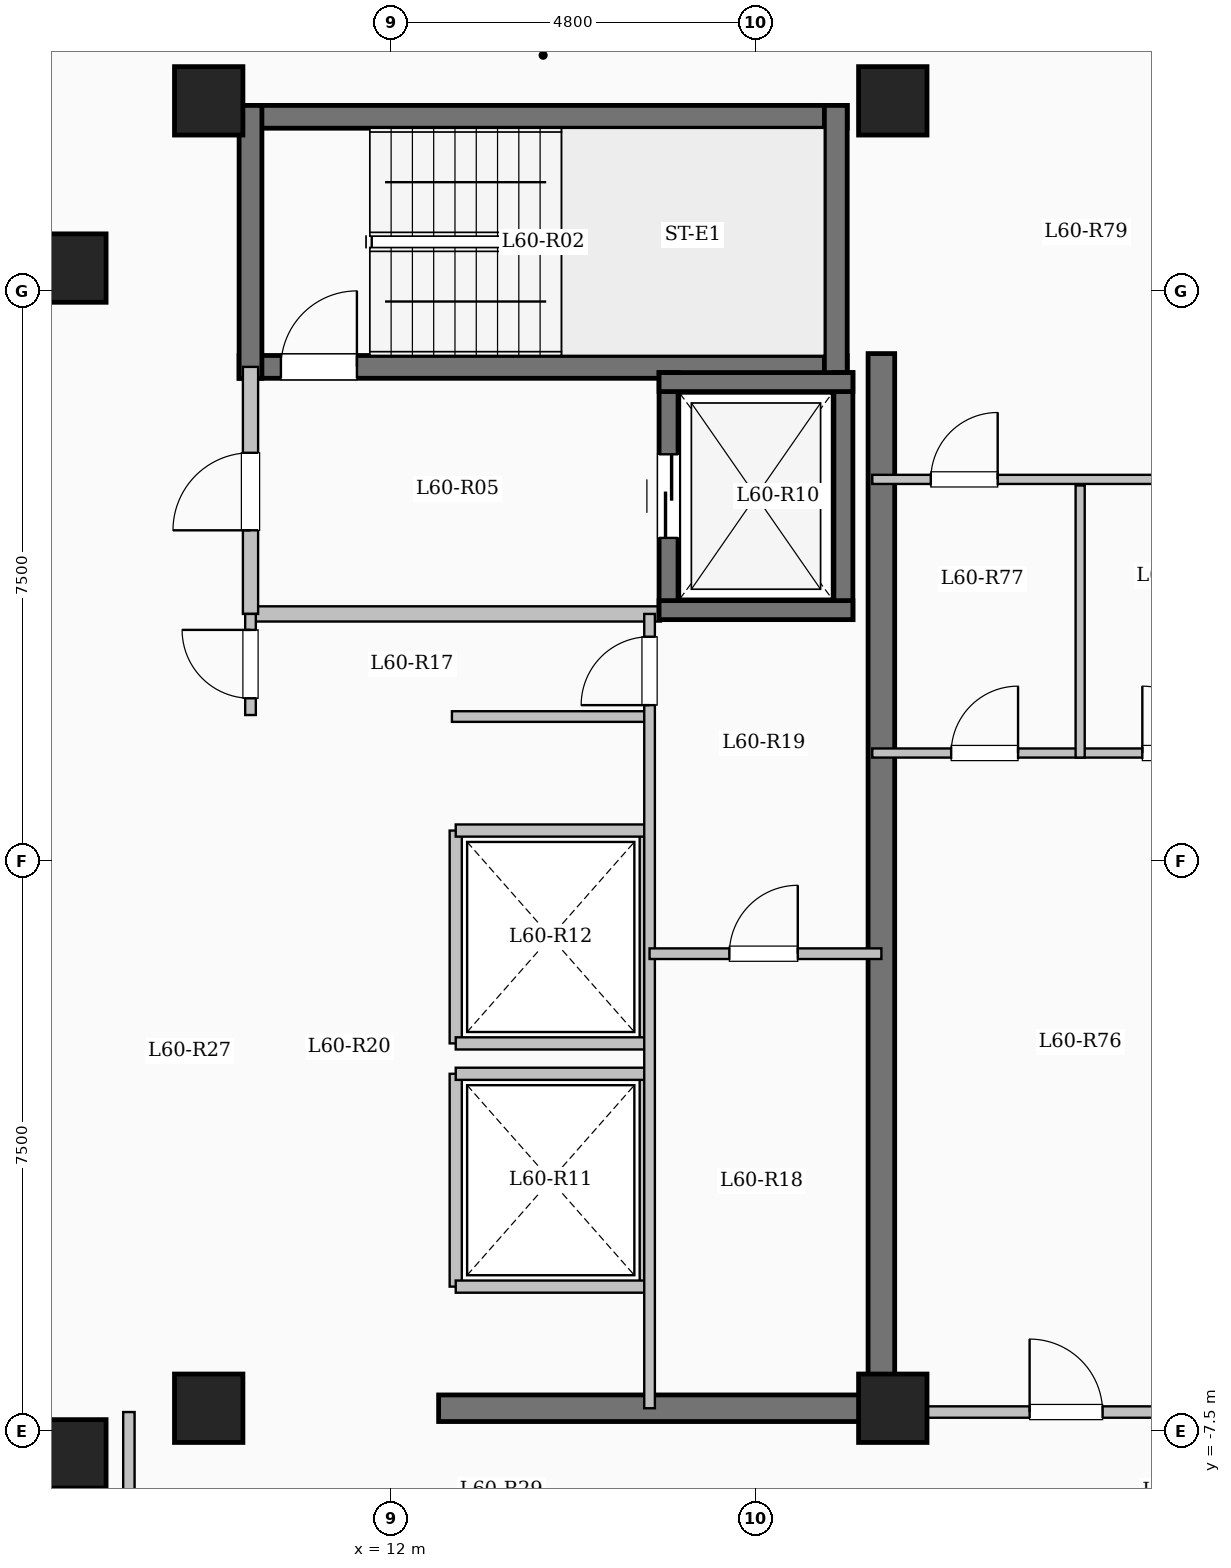
"""IFC4 building model, lengths in metres.
Left out: names, types, materials, properties, quantities, classifications, styles, units other than length and angle.
Written with IfcOpenShell. Run it as: python <this file> out.ifc"""

import sys

from ifc_helpers import new_model, si_unit, direction, frame, frame_2d, origin, origin_2d, place, context, subcontext, project, spatial, rectangle, extrude, element, fill, save


model = new_model("IFC4")
c1 = context("Model", 3, precision=1e-05, world=origin(), true_north=direction((0.0, 1.0)))
c2 = subcontext(c1, "Body", "Model", "MODEL_VIEW")
j1 = project(units=[si_unit("LENGTHUNIT", "METRE"), si_unit("PLANEANGLEUNIT", "RADIAN")], contexts=[c1])
p1 = place(None, origin())
s1 = spatial("IfcSite", under=j1, at=p1, CompositionType="ELEMENT")
p2 = place(p1, origin())
s2 = spatial("IfcBuilding", under=s1, at=p2, CompositionType="ELEMENT")
p3 = place(p2, frame((0.0, 0.0, 220.4)))
s3 = spatial("IfcBuildingStorey", under=s2, at=p3, CompositionType="ELEMENT", Elevation=220.4)
for number, where, z_axis, x_axis in (
    (1, (7.8, -7.8, 0.0), (0.0, 0.0, 1.0), (1.0, 0.0, 0.0)),
    (2, (7.8, 7.8, 0.0), (0.0, 0.0, 1.0), (1.0, 0.0, 0.0)),
    (3, (9.6, -7.2, 0.0), (0.0, 0.0, 1.0), (1.0, 0.0, 0.0)),
    (4, (9.6, 10.0, 0.0), (0.0, 0.0, 1.0), (1.0, 0.0, 0.0)),
    (5, (18.6, -7.2, 0.0), (0.0, 0.0, 1.0), (1.0, 0.0, 0.0)),
    (6, (18.6, 10.0, 0.0), (0.0, 0.0, 1.0), (1.0, 0.0, 0.0)),
):
    element("IfcColumn", number, at=place(p3, frame(where, z_axis=z_axis, x_axis=x_axis)), inside=s3, PredefinedType="COLUMN", context=c2, shape_type="SweptSolid", body=[
        extrude(rectangle(XDim=0.9, YDim=0.9, at=origin_2d()), origin(), (0.0, 0.0, 1.0), 3.35),
    ])
p4 = place(p3, frame((10.0, 9.79, 0.0), z_axis=(0.0, 0.0, 1.0), x_axis=(1.0, 0.0, 0.0)))
e7 = element("IfcWall", 7, at=p4, inside=s3, PredefinedType="SHEAR", context=c2, shape_type="SweptSolid", body=[
    extrude(rectangle(XDim=8.0, YDim=0.3, at=frame_2d((4.0, 0.0))), origin(), (0.0, 0.0, 1.0), 3.35),
])
p5 = place(p3, frame((10.0, 6.5, 0.0), z_axis=(0.0, 0.0, 1.0), x_axis=(1.0, 0.0, 0.0)))
e8 = element("IfcWall", 8, at=p5, inside=s3, PredefinedType="SHEAR", context=c2, shape_type="SweptSolid", body=[
    extrude(rectangle(XDim=8.0, YDim=0.3, at=frame_2d((4.0, 0.0))), origin(), (0.0, 0.0, 1.0), 3.35),
])
p6 = place(p5, frame((0.55, 0.0, 0.0)))
e9 = element("IfcOpeningElement", 9, at=p6, cuts=e8, PredefinedType="OPENING", context=c2, shape_type="SweptSolid", body=[
    extrude(rectangle(XDim=1.0, YDim=2.15, at=frame_2d((0.5, 1.075))), frame((0.0, 0.16, 0.0), z_axis=(0.0, -1.0, 0.0), x_axis=(1.0, 0.0, 0.0)), (0.0, 0.0, 1.0), 0.32),
])
for number, where, z_axis, x_axis in (
    (10, (10.15, 6.35, 0.0), (0.0, 0.0, 1.0), (0.0, 1.0, 0.0)),
    (11, (17.85, 6.35, 0.0), (0.0, 0.0, 1.0), (0.0, 1.0, 0.0)),
):
    element("IfcWall", number, at=place(p3, frame(where, z_axis=z_axis, x_axis=x_axis)), inside=s3, PredefinedType="SHEAR", context=c2, shape_type="SweptSolid", body=[
        extrude(rectangle(XDim=3.59, YDim=0.3, at=frame_2d((1.795, 0.0))), origin(), (0.0, 0.0, 1.0), 3.35),
    ])
p7 = place(p3, frame((10.15, 3.25, 0.0), z_axis=(0.0, 0.0, 1.0), x_axis=(1.0, 0.0, 0.0)))
e12 = element("IfcWall", 12, at=p7, inside=s3, PredefinedType="SOLIDWALL", context=c2, shape_type="SweptSolid", body=[
    extrude(rectangle(XDim=5.4, YDim=0.2, at=frame_2d((2.7, 0.0))), origin(), (0.0, 0.0, 1.0), 3.1),
])
p8 = place(p3, frame((10.15, 3.25, 0.0), z_axis=(0.0, 0.0, 1.0), x_axis=(0.0, 1.0, 0.0)))
e13 = element("IfcWall", 13, at=p8, inside=s3, PredefinedType="SOLIDWALL", context=c2, shape_type="SweptSolid", body=[
    extrude(rectangle(XDim=3.25, YDim=0.2, at=frame_2d((1.625, 0.0))), origin(), (0.0, 0.0, 1.0), 3.1),
])
p9 = place(p8, frame((1.1, 0.0, 0.0)))
e14 = element("IfcOpeningElement", 14, at=p9, cuts=e13, PredefinedType="OPENING", context=c2, shape_type="SweptSolid", body=[
    extrude(rectangle(XDim=1.02, YDim=2.15, at=frame_2d((0.51, 1.075))), frame((0.0, 0.11, 0.0), z_axis=(0.0, -1.0, 0.0), x_axis=(1.0, 0.0, 0.0)), (0.0, 0.0, 1.0), 0.22),
])
p10 = place(p3, frame((15.65, 3.175, 0.0), z_axis=(0.0, 0.0, 1.0), x_axis=(0.0, 1.0, 0.0)))
e15 = element("IfcWall", 15, at=p10, inside=s3, PredefinedType="SHEAR", context=c2, shape_type="SweptSolid", body=[
    extrude(rectangle(XDim=3.25, YDim=0.25, at=frame_2d((1.625, 0.0))), origin(), (0.0, 0.0, 1.0), 3.35),
])
p11 = place(p10, frame((1.075, 0.0, 0.0)))
e16 = element("IfcOpeningElement", 16, at=p11, cuts=e15, PredefinedType="OPENING", context=c2, shape_type="SweptSolid", body=[
    extrude(rectangle(XDim=1.1, YDim=2.15, at=frame_2d((0.55, 1.075))), frame((0.0, 0.135, 0.0), z_axis=(0.0, -1.0, 0.0), x_axis=(1.0, 0.0, 0.0)), (0.0, 0.0, 1.0), 0.27),
])
p12 = place(p3, frame((17.95, 3.175, 0.0), z_axis=(0.0, 0.0, 1.0), x_axis=(0.0, 1.0, 0.0)))
e17 = element("IfcWall", 17, at=p12, inside=s3, PredefinedType="SHEAR", context=c2, shape_type="SweptSolid", body=[
    extrude(rectangle(XDim=3.25, YDim=0.25, at=frame_2d((1.625, 0.0))), origin(), (0.0, 0.0, 1.0), 3.35),
])
for number, where, z_axis, x_axis in (
    (18, (15.525, 3.3, 0.0), (0.0, 0.0, 1.0), (1.0, 0.0, 0.0)),
    (19, (15.525, 6.3, 0.0), (0.0, 0.0, 1.0), (1.0, 0.0, 0.0)),
):
    element("IfcWall", number, at=place(p3, frame(where, z_axis=z_axis, x_axis=x_axis)), inside=s3, PredefinedType="SHEAR", context=c2, shape_type="SweptSolid", body=[
        extrude(rectangle(XDim=2.55, YDim=0.25, at=frame_2d((1.275, 0.0))), origin(), (0.0, 0.0, 1.0), 3.35),
    ])
for number, where, z_axis, x_axis in (
    (20, (12.85, -5.6, 0.0), (0.0, 0.0, 1.0), (0.0, 1.0, 0.0)),
    (21, (15.35, -5.6, 0.0), (0.0, 0.0, 1.0), (0.0, 1.0, 0.0)),
):
    element("IfcWall", number, at=place(p3, frame(where, z_axis=z_axis, x_axis=x_axis)), inside=s3, PredefinedType="SOLIDWALL", context=c2, shape_type="SweptSolid", body=[
        extrude(rectangle(XDim=2.8, YDim=0.16, at=frame_2d((1.4, 0.0))), origin(), (0.0, 0.0, 1.0), 3.1),
    ])
for number, where, z_axis, x_axis in (
    (22, (12.85, -5.6, 0.0), (0.0, 0.0, 1.0), (1.0, 0.0, 0.0)),
    (23, (12.85, -2.8, 0.0), (0.0, 0.0, 1.0), (1.0, 0.0, 0.0)),
):
    element("IfcWall", number, at=place(p3, frame(where, z_axis=z_axis, x_axis=x_axis)), inside=s3, PredefinedType="SOLIDWALL", context=c2, shape_type="SweptSolid", body=[
        extrude(rectangle(XDim=2.5, YDim=0.16, at=frame_2d((1.25, 0.0))), origin(), (0.0, 0.0, 1.0), 3.1),
    ])
for number, where, z_axis, x_axis in (
    (24, (12.85, -2.4, 0.0), (0.0, 0.0, 1.0), (0.0, 1.0, 0.0)),
    (25, (15.35, -2.4, 0.0), (0.0, 0.0, 1.0), (0.0, 1.0, 0.0)),
):
    element("IfcWall", number, at=place(p3, frame(where, z_axis=z_axis, x_axis=x_axis)), inside=s3, PredefinedType="SOLIDWALL", context=c2, shape_type="SweptSolid", body=[
        extrude(rectangle(XDim=2.8, YDim=0.16, at=frame_2d((1.4, 0.0))), origin(), (0.0, 0.0, 1.0), 3.1),
    ])
for number, where, z_axis, x_axis in (
    (26, (12.85, -2.4, 0.0), (0.0, 0.0, 1.0), (1.0, 0.0, 0.0)),
    (27, (12.85, 0.4, 0.0), (0.0, 0.0, 1.0), (1.0, 0.0, 0.0)),
):
    element("IfcWall", number, at=place(p3, frame(where, z_axis=z_axis, x_axis=x_axis)), inside=s3, PredefinedType="SOLIDWALL", context=c2, shape_type="SweptSolid", body=[
        extrude(rectangle(XDim=2.5, YDim=0.16, at=frame_2d((1.25, 0.0))), origin(), (0.0, 0.0, 1.0), 3.1),
    ])
p13 = place(p3, frame((18.45, -7.375, 0.0), z_axis=(0.0, 0.0, 1.0), x_axis=(0.0, 1.0, 0.0)))
e28 = element("IfcWall", 28, at=p13, inside=s3, PredefinedType="SHEAR", context=c2, shape_type="SweptSolid", body=[
    extrude(rectangle(XDim=14.05, YDim=0.35, at=frame_2d((7.025, 0.0))), origin(), (0.0, 0.0, 1.0), 3.35),
])
p14 = place(p3, frame((12.625, -7.2, 0.0), z_axis=(0.0, 0.0, 1.0), x_axis=(1.0, 0.0, 0.0)))
e29 = element("IfcWall", 29, at=p14, inside=s3, PredefinedType="SHEAR", context=c2, shape_type="SweptSolid", body=[
    extrude(rectangle(XDim=6.0, YDim=0.35, at=frame_2d((3.0, 0.0))), origin(), (0.0, 0.0, 1.0), 3.35),
])
p15 = place(p3, frame((12.8, 1.9, 0.0), z_axis=(0.0, 0.0, 1.0), x_axis=(1.0, 0.0, 0.0)))
e30 = element("IfcWall", 30, at=p15, inside=s3, PredefinedType="PARTITIONING", context=c2, shape_type="SweptSolid", body=[
    extrude(rectangle(XDim=2.6, YDim=0.14, at=frame_2d((1.3, 0.0))), origin(), (0.0, 0.0, 1.0), 3.1),
])
p16 = place(p3, frame((10.15, 1.92, 0.0), z_axis=(0.0, 0.0, 1.0), x_axis=(0.0, 1.0, 0.0)))
e31 = element("IfcWall", 31, at=p16, inside=s3, PredefinedType="PARTITIONING", context=c2, shape_type="SweptSolid", body=[
    extrude(rectangle(XDim=1.33, YDim=0.14, at=frame_2d((0.665, 0.0))), origin(), (0.0, 0.0, 1.0), 3.1),
])
p17 = place(p16, frame((0.22, 0.0, 0.0)))
e32 = element("IfcOpeningElement", 32, at=p17, cuts=e31, PredefinedType="OPENING", context=c2, shape_type="SweptSolid", body=[
    extrude(rectangle(XDim=0.9, YDim=2.08, at=frame_2d((0.45, 1.04))), frame((0.0, 0.08, 0.0), z_axis=(0.0, -1.0, 0.0), x_axis=(1.0, 0.0, 0.0)), (0.0, 0.0, 1.0), 0.16),
])
p18 = place(p3, frame((15.4, -7.2, 0.0), z_axis=(0.0, 0.0, 1.0), x_axis=(0.0, 1.0, 0.0)))
e33 = element("IfcWall", 33, at=p18, inside=s3, PredefinedType="PARTITIONING", context=c2, shape_type="SweptSolid", body=[
    extrude(rectangle(XDim=10.45, YDim=0.14, at=frame_2d((5.225, 0.0))), origin(), (0.0, 0.0, 1.0), 3.1),
])
p19 = place(p18, frame((9.25, 0.0, 0.0)))
e34 = element("IfcOpeningElement", 34, at=p19, cuts=e33, PredefinedType="OPENING", context=c2, shape_type="SweptSolid", body=[
    extrude(rectangle(XDim=0.9, YDim=2.08, at=frame_2d((0.45, 1.04))), frame((0.0, 0.08, 0.0), z_axis=(0.0, -1.0, 0.0), x_axis=(1.0, 0.0, 0.0)), (0.0, 0.0, 1.0), 0.16),
])
p20 = place(p3, frame((15.4, -1.22, 0.0), z_axis=(0.0, 0.0, 1.0), x_axis=(1.0, 0.0, 0.0)))
e35 = element("IfcWall", 35, at=p20, inside=s3, PredefinedType="PARTITIONING", context=c2, shape_type="SweptSolid", body=[
    extrude(rectangle(XDim=3.05, YDim=0.14, at=frame_2d((1.525, 0.0))), origin(), (0.0, 0.0, 1.0), 3.1),
])
p21 = place(p20, frame((1.05, 0.0, 0.0)))
e36 = element("IfcOpeningElement", 36, at=p21, cuts=e35, PredefinedType="OPENING", context=c2, shape_type="SweptSolid", body=[
    extrude(rectangle(XDim=0.9, YDim=2.08, at=frame_2d((0.45, 1.04))), frame((0.0, 0.08, 0.0), z_axis=(0.0, -1.0, 0.0), x_axis=(1.0, 0.0, 0.0)), (0.0, 0.0, 1.0), 0.16),
])
p22 = place(p3, frame((8.55, -9.4, 0.0), z_axis=(0.0, 0.0, 1.0), x_axis=(0.0, 1.0, 0.0)))
e37 = element("IfcWall", 37, at=p22, inside=s3, PredefinedType="PARTITIONING", context=c2, shape_type="SweptSolid", body=[
    extrude(rectangle(XDim=2.15, YDim=0.15, at=frame_2d((1.075, 0.0))), origin(), (0.0, 0.0, 1.0), 3.1),
])
p23 = place(p3, frame((18.45, -7.25, 0.0), z_axis=(0.0, 0.0, 1.0), x_axis=(1.0, 0.0, 0.0)))
e38 = element("IfcWall", 38, at=p23, inside=s3, PredefinedType="PARTITIONING", context=c2, shape_type="SweptSolid", body=[
    extrude(rectangle(XDim=5.13, YDim=0.15, at=frame_2d((2.565, 0.0))), origin(), (0.0, 0.0, 1.0), 3.1),
])
p24 = place(p23, frame((1.95, 0.0, 0.0)))
e39 = element("IfcOpeningElement", 39, at=p24, cuts=e38, PredefinedType="OPENING", context=c2, shape_type="SweptSolid", body=[
    extrude(rectangle(XDim=0.96, YDim=2.15, at=frame_2d((0.48, 1.075))), frame((0.0, 0.085, 0.0), z_axis=(0.0, -1.0, 0.0), x_axis=(1.0, 0.0, 0.0)), (0.0, 0.0, 1.0), 0.17),
])
p25 = place(p3, frame((18.33, 1.42, 0.0), z_axis=(0.0, 0.0, 1.0), x_axis=(1.0, 0.0, 0.0)))
e40 = element("IfcWall", 40, at=p25, inside=s3, PredefinedType="PARTITIONING", context=c2, shape_type="SweptSolid", body=[
    extrude(rectangle(XDim=5.37, YDim=0.12, at=frame_2d((2.685, 0.0))), origin(), (0.0, 0.0, 1.0), 3.1),
])
p26 = place(p25, frame((1.038, 0.0, 0.0)))
e41 = element("IfcOpeningElement", 41, at=p26, cuts=e40, PredefinedType="OPENING", context=c2, shape_type="SweptSolid", body=[
    extrude(rectangle(XDim=0.88, YDim=2.1, at=frame_2d((0.44, 1.05))), frame((0.0, 0.07, 0.0), z_axis=(0.0, -1.0, 0.0), x_axis=(1.0, 0.0, 0.0)), (0.0, 0.0, 1.0), 0.14),
])
p27 = place(p25, frame((3.553, 0.0, 0.0)))
e42 = element("IfcOpeningElement", 42, at=p27, cuts=e40, PredefinedType="OPENING", context=c2, shape_type="SweptSolid", body=[
    extrude(rectangle(XDim=0.88, YDim=2.1, at=frame_2d((0.44, 1.05))), frame((0.0, 0.07, 0.0), z_axis=(0.0, -1.0, 0.0), x_axis=(1.0, 0.0, 0.0)), (0.0, 0.0, 1.0), 0.14),
])
p28 = place(p3, frame((18.33, 5.02, 0.0), z_axis=(0.0, 0.0, 1.0), x_axis=(1.0, 0.0, 0.0)))
e43 = element("IfcWall", 43, at=p28, inside=s3, PredefinedType="PARTITIONING", context=c2, shape_type="SweptSolid", body=[
    extrude(rectangle(XDim=5.37, YDim=0.12, at=frame_2d((2.685, 0.0))), origin(), (0.0, 0.0, 1.0), 3.1),
])
p29 = place(p28, frame((0.77, 0.0, 0.0)))
e44 = element("IfcOpeningElement", 44, at=p29, cuts=e43, PredefinedType="OPENING", context=c2, shape_type="SweptSolid", body=[
    extrude(rectangle(XDim=0.88, YDim=2.1, at=frame_2d((0.44, 1.05))), frame((0.0, 0.07, 0.0), z_axis=(0.0, -1.0, 0.0), x_axis=(1.0, 0.0, 0.0)), (0.0, 0.0, 1.0), 0.14),
])
p30 = place(p3, frame((21.065, 1.36, 0.0), z_axis=(0.0, 0.0, 1.0), x_axis=(0.0, 1.0, 0.0)))
e45 = element("IfcWall", 45, at=p30, inside=s3, PredefinedType="PARTITIONING", context=c2, shape_type="SweptSolid", body=[
    extrude(rectangle(XDim=3.58, YDim=0.12, at=frame_2d((1.79, 0.0))), origin(), (0.0, 0.0, 1.0), 3.1),
])
p31 = place(p6, origin())
e46 = element("IfcDoor", 46, at=p31, inside=s3, OperationType="SINGLE_SWING_RIGHT", PredefinedType="DOOR", context=c2, shape_type="SweptSolid", body=[
    extrude(rectangle(XDim=1.0, YDim=2.15, at=frame_2d((0.5, 1.075))), frame((0.0, 0.025, 0.0), z_axis=(0.0, -1.0, 0.0), x_axis=(1.0, 0.0, 0.0)), (0.0, 0.0, 1.0), 0.05),
])
fill(e9, e46)
p32 = place(p9, origin())
e47 = element("IfcDoor", 47, at=p32, inside=s3, OperationType="SINGLE_SWING_LEFT", PredefinedType="DOOR", context=c2, shape_type="SweptSolid", body=[
    extrude(rectangle(XDim=1.02, YDim=2.15, at=frame_2d((0.51, 1.075))), frame((0.0, 0.025, 0.0), z_axis=(0.0, -1.0, 0.0), x_axis=(1.0, 0.0, 0.0)), (0.0, 0.0, 1.0), 0.05),
])
fill(e14, e47)
p33 = place(p11, origin())
e48 = element("IfcDoor", 48, at=p33, inside=s3, OperationType="SLIDING_TO_LEFT", PredefinedType="DOOR", context=c2, shape_type="SweptSolid", body=[
    extrude(rectangle(XDim=1.1, YDim=2.15, at=frame_2d((0.55, 1.075))), frame((0.0, 0.025, 0.0), z_axis=(0.0, -1.0, 0.0), x_axis=(1.0, 0.0, 0.0)), (0.0, 0.0, 1.0), 0.05),
])
fill(e16, e48)
p34 = place(p17, origin())
e49 = element("IfcDoor", 49, at=p34, inside=s3, OperationType="SINGLE_SWING_RIGHT", PredefinedType="DOOR", context=c2, shape_type="SweptSolid", body=[
    extrude(rectangle(XDim=0.9, YDim=2.08, at=frame_2d((0.45, 1.04))), frame((0.0, 0.025, 0.0), z_axis=(0.0, -1.0, 0.0), x_axis=(1.0, 0.0, 0.0)), (0.0, 0.0, 1.0), 0.05),
])
fill(e32, e49)
p35 = place(p19, origin())
e50 = element("IfcDoor", 50, at=p35, inside=s3, OperationType="SINGLE_SWING_LEFT", PredefinedType="DOOR", context=c2, shape_type="SweptSolid", body=[
    extrude(rectangle(XDim=0.9, YDim=2.08, at=frame_2d((0.45, 1.04))), frame((0.0, 0.025, 0.0), z_axis=(0.0, -1.0, 0.0), x_axis=(1.0, 0.0, 0.0)), (0.0, 0.0, 1.0), 0.05),
])
fill(e34, e50)
p36 = place(p21, origin())
e51 = element("IfcDoor", 51, at=p36, inside=s3, OperationType="SINGLE_SWING_RIGHT", PredefinedType="DOOR", context=c2, shape_type="SweptSolid", body=[
    extrude(rectangle(XDim=0.9, YDim=2.08, at=frame_2d((0.45, 1.04))), frame((0.0, 0.025, 0.0), z_axis=(0.0, -1.0, 0.0), x_axis=(1.0, 0.0, 0.0)), (0.0, 0.0, 1.0), 0.05),
])
fill(e36, e51)
p37 = place(p24, origin())
e52 = element("IfcDoor", 52, at=p37, inside=s3, OperationType="SINGLE_SWING_LEFT", PredefinedType="DOOR", context=c2, shape_type="SweptSolid", body=[
    extrude(rectangle(XDim=0.96, YDim=2.15, at=frame_2d((0.48, 1.075))), frame((0.0, 0.025, 0.0), z_axis=(0.0, -1.0, 0.0), x_axis=(1.0, 0.0, 0.0)), (0.0, 0.0, 1.0), 0.05),
])
fill(e39, e52)
p38 = place(p26, origin())
e53 = element("IfcDoor", 53, at=p38, inside=s3, OperationType="SINGLE_SWING_RIGHT", PredefinedType="DOOR", context=c2, shape_type="SweptSolid", body=[
    extrude(rectangle(XDim=0.88, YDim=2.1, at=frame_2d((0.44, 1.05))), frame((0.0, 0.025, 0.0), z_axis=(0.0, -1.0, 0.0), x_axis=(1.0, 0.0, 0.0)), (0.0, 0.0, 1.0), 0.05),
])
fill(e41, e53)
p39 = place(p27, origin())
e54 = element("IfcDoor", 54, at=p39, inside=s3, OperationType="SINGLE_SWING_LEFT", PredefinedType="DOOR", context=c2, shape_type="SweptSolid", body=[
    extrude(rectangle(XDim=0.88, YDim=2.1, at=frame_2d((0.44, 1.05))), frame((0.0, 0.025, 0.0), z_axis=(0.0, -1.0, 0.0), x_axis=(1.0, 0.0, 0.0)), (0.0, 0.0, 1.0), 0.05),
])
fill(e42, e54)
p40 = place(p29, origin())
e55 = element("IfcDoor", 55, at=p40, inside=s3, OperationType="SINGLE_SWING_RIGHT", PredefinedType="DOOR", context=c2, shape_type="SweptSolid", body=[
    extrude(rectangle(XDim=0.88, YDim=2.1, at=frame_2d((0.44, 1.05))), frame((0.0, 0.025, 0.0), z_axis=(0.0, -1.0, 0.0), x_axis=(1.0, 0.0, 0.0)), (0.0, 0.0, 1.0), 0.05),
])
fill(e44, e55)
save(model, sys.argv[1])
